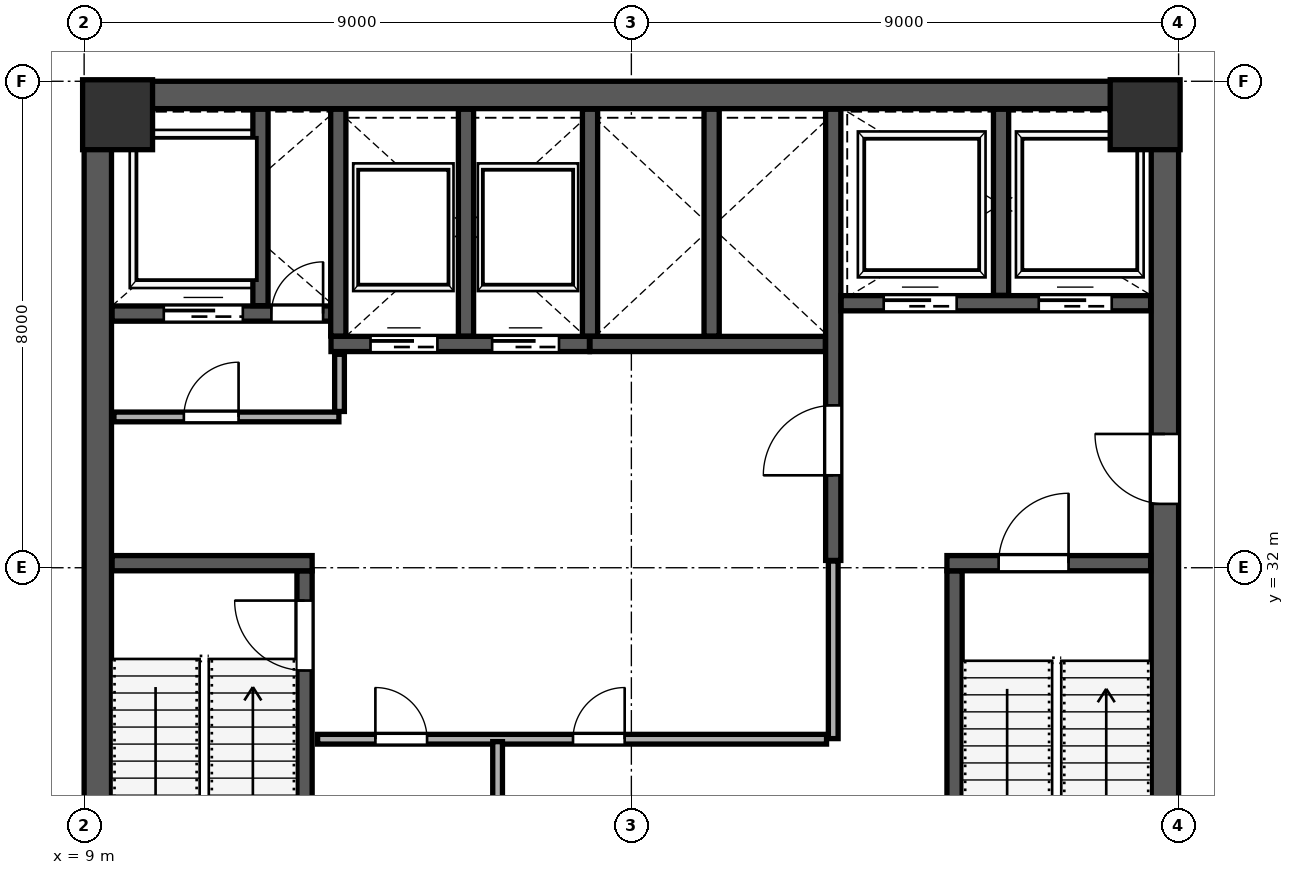
"""IFC4 building model, lengths in metres.
Left out: names, types, materials, properties, quantities, classifications, styles, units other than length and angle.
Written with IfcOpenShell. Run it as: python <this file> out.ifc"""

import sys

from ifc_helpers import new_model, si_unit, direction, frame, frame_2d, origin, origin_2d, place, context, subcontext, project, spatial, rectangle, extrude, source, transform, mapped, element, fill, save


model = new_model("IFC4")
c1 = context("Model", 3, precision=1e-05, world=origin(), true_north=direction((0.0, 1.0)))
c2 = subcontext(c1, "Body", "Model", "MODEL_VIEW")
j1 = project(units=[si_unit("LENGTHUNIT", "METRE"), si_unit("PLANEANGLEUNIT", "RADIAN")], contexts=[c1])
p1 = place(None, origin())
s1 = spatial("IfcSite", under=j1, at=p1, CompositionType="ELEMENT")
p2 = place(p1, origin())
s2 = spatial("IfcBuilding", under=s1, at=p2, CompositionType="ELEMENT")
p3 = place(p2, frame((0.0, 0.0, 183.4)))
s3 = spatial("IfcBuildingStorey", under=s2, at=p3, CompositionType="ELEMENT", Elevation=183.4)
m1 = source(origin(), c2, "Body", "SweptSolid", [
    extrude(rectangle(XDim=1.15, YDim=1.15, at=origin_2d()), origin(), (0.0, 0.0, 1.0), 4.199),
])
for number, where, z_axis, x_axis in (
    (1, (9.55, 39.45, 0.001), (0.0, 0.0, 1.0), (1.0, 0.0, 0.0)),
    (2, (26.45, 39.45, 0.001), (0.0, 0.0, 1.0), (1.0, 0.0, 0.0)),
):
    element("IfcColumn", number, at=place(p3, frame(where, z_axis=z_axis, x_axis=x_axis)), inside=s3, PredefinedType="COLUMN", context=c2, shape_type="MappedRepresentation", body=[
        mapped(m1, transform((0.0, 0.0, 0.0), scale=1.0)),
    ])
p4 = place(p3, frame((9.225, 24.45, 0.0), z_axis=(0.0, 0.0, 1.0), x_axis=(0.0, 1.0, 0.0)))
e3 = element("IfcWall", 3, at=p4, inside=s3, PredefinedType="SHEAR", context=c2, shape_type="SweptSolid", body=[
    extrude(rectangle(XDim=15.1, YDim=0.45, at=frame_2d((7.55, 0.0))), origin(), (0.0, 0.0, 1.0), 3.96),
])
p5 = place(p3, frame((26.775, 24.45, 0.0), z_axis=(0.0, 0.0, 1.0), x_axis=(0.0, 1.0, 0.0)))
e4 = element("IfcWall", 4, at=p5, inside=s3, PredefinedType="SHEAR", context=c2, shape_type="SweptSolid", body=[
    extrude(rectangle(XDim=15.1, YDim=0.45, at=frame_2d((7.55, 0.0))), origin(), (0.0, 0.0, 1.0), 3.96),
])
p6 = place(p5, frame((8.6, 0.0, 0.0)))
e5 = element("IfcOpeningElement", 5, at=p6, cuts=e4, PredefinedType="OPENING", context=c2, shape_type="SweptSolid", body=[
    extrude(rectangle(XDim=1.15, YDim=2.2, at=frame_2d((0.575, 1.1))), frame((0.0, 0.235, 0.0), z_axis=(0.0, -1.0, 0.0), x_axis=(1.0, 0.0, 0.0)), (0.0, 0.0, 1.0), 0.47),
])
p7 = place(p3, frame((9.0, 39.775, 0.0), z_axis=(0.0, 0.0, 1.0), x_axis=(1.0, 0.0, 0.0)))
e6 = element("IfcWall", 6, at=p7, inside=s3, PredefinedType="SHEAR", context=c2, shape_type="SweptSolid", body=[
    extrude(rectangle(XDim=18.0, YDim=0.45, at=frame_2d((9.0, 0.0))), origin(), (0.0, 0.0, 1.0), 3.96),
])
p8 = place(p3, frame((12.625, 24.46, 0.0), z_axis=(0.0, 0.0, 1.0), x_axis=(0.0, 1.0, 0.0)))
e7 = element("IfcWall", 7, at=p8, inside=s3, PredefinedType="SHEAR", context=c2, shape_type="SweptSolid", body=[
    extrude(rectangle(XDim=7.49, YDim=0.25, at=frame_2d((3.745, 0.0))), origin(), (0.0, 0.0, 1.0), 3.96),
])
p9 = place(p8, frame((5.85, 0.0, 0.0)))
e8 = element("IfcOpeningElement", 8, at=p9, cuts=e7, PredefinedType="OPENING", context=c2, shape_type="SweptSolid", body=[
    extrude(rectangle(XDim=1.15, YDim=2.2, at=frame_2d((0.575, 1.1))), frame((0.0, 0.135, 0.0), z_axis=(0.0, -1.0, 0.0), x_axis=(1.0, 0.0, 0.0)), (0.0, 0.0, 1.0), 0.27),
])
p10 = place(p3, frame((9.46, 32.075, 0.0), z_axis=(0.0, 0.0, 1.0), x_axis=(1.0, 0.0, 0.0)))
e9 = element("IfcWall", 9, at=p10, inside=s3, PredefinedType="SHEAR", context=c2, shape_type="SweptSolid", body=[
    extrude(rectangle(XDim=3.29, YDim=0.25, at=frame_2d((1.645, 0.0))), origin(), (0.0, 0.0, 1.0), 3.96),
])
p11 = place(p3, frame((23.315, 24.46, 0.0), z_axis=(0.0, 0.0, 1.0), x_axis=(0.0, 1.0, 0.0)))
e10 = element("IfcWall", 10, at=p11, inside=s3, PredefinedType="SHEAR", context=c2, shape_type="SweptSolid", body=[
    extrude(rectangle(XDim=7.49, YDim=0.25, at=frame_2d((3.745, 0.0))), origin(), (0.0, 0.0, 1.0), 3.96),
])
p12 = place(p3, frame((23.19, 32.075, 0.0), z_axis=(0.0, 0.0, 1.0), x_axis=(1.0, 0.0, 0.0)))
e11 = element("IfcWall", 11, at=p12, inside=s3, PredefinedType="SHEAR", context=c2, shape_type="SweptSolid", body=[
    extrude(rectangle(XDim=3.35, YDim=0.25, at=frame_2d((1.675, 0.0))), origin(), (0.0, 0.0, 1.0), 3.96),
])
p13 = place(p12, frame((0.85, 0.0, 0.0)))
e12 = element("IfcOpeningElement", 12, at=p13, cuts=e11, PredefinedType="OPENING", context=c2, shape_type="SweptSolid", body=[
    extrude(rectangle(XDim=1.15, YDim=2.2, at=frame_2d((0.575, 1.1))), frame((0.0, 0.135, 0.0), z_axis=(0.0, -1.0, 0.0), x_axis=(1.0, 0.0, 0.0)), (0.0, 0.0, 1.0), 0.27),
])
p14 = place(p3, frame((21.32, 32.12, 0.0), z_axis=(0.0, 0.0, 1.0), x_axis=(0.0, 1.0, 0.0)))
e13 = element("IfcWall", 13, at=p14, inside=s3, PredefinedType="SHEAR", context=c2, shape_type="SweptSolid", body=[
    extrude(rectangle(XDim=7.42, YDim=0.25, at=frame_2d((3.71, 0.0))), origin(), (0.0, 0.0, 1.0), 3.96),
])
p15 = place(p14, frame((1.4, 0.0, 0.0)))
e14 = element("IfcOpeningElement", 14, at=p15, cuts=e13, PredefinedType="OPENING", context=c2, shape_type="SweptSolid", body=[
    extrude(rectangle(XDim=1.15, YDim=2.2, at=frame_2d((0.575, 1.1))), frame((0.0, 0.135, 0.0), z_axis=(0.0, -1.0, 0.0), x_axis=(1.0, 0.0, 0.0)), (0.0, 0.0, 1.0), 0.27),
])
p16 = place(p3, frame((9.46, 36.18, 0.0), z_axis=(0.0, 0.0, 1.0), x_axis=(1.0, 0.0, 0.0)))
e15 = element("IfcWall", 15, at=p16, inside=s3, PredefinedType="SHEAR", context=c2, shape_type="SweptSolid", body=[
    extrude(rectangle(XDim=3.79, YDim=0.25, at=frame_2d((1.895, 0.0))), origin(), (0.0, 0.0, 1.0), 3.96),
])
p17 = place(p16, frame((2.62, 0.0, 0.0)))
e16 = element("IfcOpeningElement", 16, at=p17, cuts=e15, PredefinedType="OPENING", context=c2, shape_type="SweptSolid", body=[
    extrude(rectangle(XDim=0.85, YDim=2.1, at=frame_2d((0.425, 1.05))), frame((0.0, 0.135, 0.0), z_axis=(0.0, -1.0, 0.0), x_axis=(1.0, 0.0, 0.0)), (0.0, 0.0, 1.0), 0.27),
])
p18 = place(p16, frame((0.85, 0.0, 0.0)))
e17 = element("IfcOpeningElement", 17, at=p18, cuts=e15, PredefinedType="OPENING", context=c2, shape_type="SweptSolid", body=[
    extrude(rectangle(XDim=1.3, YDim=2.25, at=frame_2d((0.65, 1.125))), frame((0.0, 0.135, 0.0), z_axis=(0.0, -1.0, 0.0), x_axis=(1.0, 0.0, 0.0)), (0.0, 0.0, 1.0), 0.27),
])
p19 = place(p3, frame((11.9, 36.31, 0.0), z_axis=(0.0, 0.0, 1.0), x_axis=(0.0, 1.0, 0.0)))
e18 = element("IfcWall", 18, at=p19, inside=s3, PredefinedType="SHEAR", context=c2, shape_type="SweptSolid", body=[
    extrude(rectangle(XDim=3.23, YDim=0.25, at=frame_2d((1.615, 0.0))), origin(), (0.0, 0.0, 1.0), 3.96),
])
p20 = place(p3, frame((21.45, 36.35, 0.0), z_axis=(0.0, 0.0, 1.0), x_axis=(1.0, 0.0, 0.0)))
e19 = element("IfcWall", 19, at=p20, inside=s3, PredefinedType="SHEAR", context=c2, shape_type="SweptSolid", body=[
    extrude(rectangle(XDim=5.09, YDim=0.25, at=frame_2d((2.545, 0.0))), origin(), (0.0, 0.0, 1.0), 3.96),
])
p21 = place(p20, frame((0.7, 0.0, 0.0)))
e20 = element("IfcOpeningElement", 20, at=p21, cuts=e19, PredefinedType="OPENING", context=c2, shape_type="SweptSolid", body=[
    extrude(rectangle(XDim=1.2, YDim=2.2, at=frame_2d((0.6, 1.1))), frame((0.0, 0.135, 0.0), z_axis=(0.0, -1.0, 0.0), x_axis=(1.0, 0.0, 0.0)), (0.0, 0.0, 1.0), 0.27),
])
p22 = place(p20, frame((3.25, 0.0, 0.0)))
e21 = element("IfcOpeningElement", 21, at=p22, cuts=e19, PredefinedType="OPENING", context=c2, shape_type="SweptSolid", body=[
    extrude(rectangle(XDim=1.2, YDim=2.2, at=frame_2d((0.6, 1.1))), frame((0.0, 0.135, 0.0), z_axis=(0.0, -1.0, 0.0), x_axis=(1.0, 0.0, 0.0)), (0.0, 0.0, 1.0), 0.27),
])
p23 = place(p3, frame((24.08, 36.48, 0.0), z_axis=(0.0, 0.0, 1.0), x_axis=(0.0, 1.0, 0.0)))
e22 = element("IfcWall", 22, at=p23, inside=s3, PredefinedType="SHEAR", context=c2, shape_type="SweptSolid", body=[
    extrude(rectangle(XDim=3.06, YDim=0.25, at=frame_2d((1.53, 0.0))), origin(), (0.0, 0.0, 1.0), 3.96),
])
p24 = place(p3, frame((13.06, 35.68, 0.0), z_axis=(0.0, 0.0, 1.0), x_axis=(1.0, 0.0, 0.0)))
e23 = element("IfcWall", 23, at=p24, inside=s3, PredefinedType="SHEAR", context=c2, shape_type="SweptSolid", body=[
    extrude(rectangle(XDim=4.25, YDim=0.25, at=frame_2d((2.125, 0.0))), origin(), (0.0, 0.0, 1.0), 3.96),
])
p25 = place(p24, frame((0.65, 0.0, 0.0)))
e24 = element("IfcOpeningElement", 24, at=p25, cuts=e23, PredefinedType="OPENING", context=c2, shape_type="SweptSolid", body=[
    extrude(rectangle(XDim=1.1, YDim=2.2, at=frame_2d((0.55, 1.1))), frame((0.0, 0.135, 0.0), z_axis=(0.0, -1.0, 0.0), x_axis=(1.0, 0.0, 0.0)), (0.0, 0.0, 1.0), 0.27),
])
p26 = place(p24, frame((2.65, 0.0, 0.0)))
e25 = element("IfcOpeningElement", 25, at=p26, cuts=e23, PredefinedType="OPENING", context=c2, shape_type="SweptSolid", body=[
    extrude(rectangle(XDim=1.1, YDim=2.2, at=frame_2d((0.55, 1.1))), frame((0.0, 0.135, 0.0), z_axis=(0.0, -1.0, 0.0), x_axis=(1.0, 0.0, 0.0)), (0.0, 0.0, 1.0), 0.27),
])
for number, where, z_axis, x_axis in (
    (26, (13.18, 35.81, 0.0), (0.0, 0.0, 1.0), (0.0, 1.0, 0.0)),
    (27, (15.28, 35.81, 0.0), (0.0, 0.0, 1.0), (0.0, 1.0, 0.0)),
):
    element("IfcWall", number, at=place(p3, frame(where, z_axis=z_axis, x_axis=x_axis)), inside=s3, PredefinedType="SHEAR", context=c2, shape_type="SweptSolid", body=[
        extrude(rectangle(XDim=3.73, YDim=0.25, at=frame_2d((1.865, 0.0))), origin(), (0.0, 0.0, 1.0), 3.96),
    ])
p27 = place(p3, frame((17.32, 35.68, 0.0), z_axis=(0.0, 0.0, 1.0), x_axis=(1.0, 0.0, 0.0)))
e28 = element("IfcWall", 28, at=p27, inside=s3, PredefinedType="SHEAR", context=c2, shape_type="SweptSolid", body=[
    extrude(rectangle(XDim=3.87, YDim=0.25, at=frame_2d((1.935, 0.0))), origin(), (0.0, 0.0, 1.0), 3.96),
])
for number, where, z_axis, x_axis in (
    (29, (17.32, 35.81, 0.0), (0.0, 0.0, 1.0), (0.0, 1.0, 0.0)),
    (30, (19.32, 35.81, 0.0), (0.0, 0.0, 1.0), (0.0, 1.0, 0.0)),
):
    element("IfcWall", number, at=place(p3, frame(where, z_axis=z_axis, x_axis=x_axis)), inside=s3, PredefinedType="SHEAR", context=c2, shape_type="SweptSolid", body=[
        extrude(rectangle(XDim=3.73, YDim=0.25, at=frame_2d((1.865, 0.0))), origin(), (0.0, 0.0, 1.0), 3.96),
    ])
p28 = place(p3, frame((9.49, 34.48, 0.0), z_axis=(0.0, 0.0, 1.0), x_axis=(1.0, 0.0, 0.0)))
e31 = element("IfcWall", 31, at=p28, inside=s3, PredefinedType="PARTITIONING", context=c2, shape_type="SweptSolid", body=[
    extrude(rectangle(XDim=3.7, YDim=0.16, at=frame_2d((1.85, 0.0))), origin(), (0.0, 0.0, 1.0), 3.96),
])
p29 = place(p28, frame((1.15, 0.0, 0.0)))
e32 = element("IfcOpeningElement", 32, at=p29, cuts=e31, PredefinedType="OPENING", context=c2, shape_type="SweptSolid", body=[
    extrude(rectangle(XDim=0.9, YDim=2.15, at=frame_2d((0.45, 1.075))), frame((0.0, 0.09, 0.0), z_axis=(0.0, -1.0, 0.0), x_axis=(1.0, 0.0, 0.0)), (0.0, 0.0, 1.0), 0.18),
])
p30 = place(p3, frame((13.2, 34.57, 0.0), z_axis=(0.0, 0.0, 1.0), x_axis=(0.0, 1.0, 0.0)))
e33 = element("IfcWall", 33, at=p30, inside=s3, PredefinedType="PARTITIONING", context=c2, shape_type="SweptSolid", body=[
    extrude(rectangle(XDim=0.94, YDim=0.16, at=frame_2d((0.47, 0.0))), origin(), (0.0, 0.0, 1.0), 3.96),
])
p31 = place(p3, frame((12.84, 29.18, 0.0), z_axis=(0.0, 0.0, 1.0), x_axis=(1.0, 0.0, 0.0)))
e34 = element("IfcWall", 34, at=p31, inside=s3, PredefinedType="PARTITIONING", context=c2, shape_type="SweptSolid", body=[
    extrude(rectangle(XDim=8.37, YDim=0.16, at=frame_2d((4.185, 0.0))), origin(), (0.0, 0.0, 1.0), 3.96),
])
p32 = place(p31, frame((0.95, 0.0, 0.0)))
e35 = element("IfcOpeningElement", 35, at=p32, cuts=e34, PredefinedType="OPENING", context=c2, shape_type="SweptSolid", body=[
    extrude(rectangle(XDim=0.85, YDim=2.1, at=frame_2d((0.425, 1.05))), frame((0.0, 0.09, 0.0), z_axis=(0.0, -1.0, 0.0), x_axis=(1.0, 0.0, 0.0)), (0.0, 0.0, 1.0), 0.18),
])
p33 = place(p31, frame((4.2, 0.0, 0.0)))
e36 = element("IfcOpeningElement", 36, at=p33, cuts=e34, PredefinedType="OPENING", context=c2, shape_type="SweptSolid", body=[
    extrude(rectangle(XDim=0.85, YDim=2.1, at=frame_2d((0.425, 1.05))), frame((0.0, 0.09, 0.0), z_axis=(0.0, -1.0, 0.0), x_axis=(1.0, 0.0, 0.0)), (0.0, 0.0, 1.0), 0.18),
])
p34 = place(p3, frame((15.8, 24.54, 0.0), z_axis=(0.0, 0.0, 1.0), x_axis=(0.0, 1.0, 0.0)))
e37 = element("IfcWall", 37, at=p34, inside=s3, PredefinedType="PARTITIONING", context=c2, shape_type="SweptSolid", body=[
    extrude(rectangle(XDim=4.6, YDim=0.16, at=frame_2d((2.3, 0.0))), origin(), (0.0, 0.0, 1.0), 3.96),
])
p35 = place(p3, frame((21.32, 29.19, 0.0), z_axis=(0.0, 0.0, 1.0), x_axis=(0.0, 1.0, 0.0)))
e38 = element("IfcWall", 38, at=p35, inside=s3, PredefinedType="PARTITIONING", context=c2, shape_type="SweptSolid", body=[
    extrude(rectangle(XDim=2.92, YDim=0.16, at=frame_2d((1.46, 0.0))), origin(), (0.0, 0.0, 1.0), 3.96),
])
p36 = place(p3, frame((13.23, 49.696, 0.0), z_axis=(0.0, 0.0, 1.0), x_axis=(0.866026251752, -0.499998531275, 0.0)))
e39 = element("IfcWall", 39, at=p36, inside=s3, PredefinedType="PARTITIONING", context=c2, shape_type="SweptSolid", body=[
    extrude(rectangle(XDim=26.69, YDim=0.115, at=frame_2d((13.345, 0.0))), origin(), (0.0, 0.0, 1.0), 3.96),
])
p37 = place(p36, frame((2.1, 0.0, 0.0)))
e40 = element("IfcOpeningElement", 40, at=p37, cuts=e39, PredefinedType="OPENING", context=c2, shape_type="SweptSolid", body=[
    extrude(rectangle(XDim=0.95, YDim=2.15, at=frame_2d((0.475, 1.075))), frame((0.0, 0.067, 0.0), z_axis=(0.0, -1.0, 0.0), x_axis=(1.0, 0.0, 0.0)), (0.0, 0.0, 1.0), 0.135),
])
p38 = place(p36, frame((18.2, 0.0, 0.0)))
e41 = element("IfcOpeningElement", 41, at=p38, cuts=e39, PredefinedType="OPENING", context=c2, shape_type="SweptSolid", body=[
    extrude(rectangle(XDim=0.95, YDim=2.15, at=frame_2d((0.475, 1.075))), frame((0.0, 0.067, 0.0), z_axis=(0.0, -1.0, 0.0), x_axis=(1.0, 0.0, 0.0)), (0.0, 0.0, 1.0), 0.135),
])
p39 = place(p3, frame((1.625, 29.676, 0.0), z_axis=(0.0, 0.0, 1.0), x_axis=(0.500002707681, 0.866023840498, 0.0)))
e42 = element("IfcWall", 42, at=p39, inside=s3, PredefinedType="PARTITIONING", context=c2, shape_type="SweptSolid", body=[
    extrude(rectangle(XDim=23.1, YDim=0.115, at=frame_2d((11.55, 0.0))), origin(), (0.0, 0.0, 1.0), 3.96),
])
p40 = place(p39, frame((1.3, 0.0, 0.0)))
e43 = element("IfcOpeningElement", 43, at=p40, cuts=e42, PredefinedType="OPENING", context=c2, shape_type="SweptSolid", body=[
    extrude(rectangle(XDim=0.95, YDim=2.15, at=frame_2d((0.475, 1.075))), frame((0.0, 0.067, 0.0), z_axis=(0.0, -1.0, 0.0), x_axis=(1.0, 0.0, 0.0)), (0.0, 0.0, 1.0), 0.135),
])
p41 = place(p39, frame((14.6, 0.0, 0.0)))
e44 = element("IfcOpeningElement", 44, at=p41, cuts=e42, PredefinedType="OPENING", context=c2, shape_type="SweptSolid", body=[
    extrude(rectangle(XDim=0.95, YDim=2.15, at=frame_2d((0.475, 1.075))), frame((0.0, 0.067, 0.0), z_axis=(0.0, -1.0, 0.0), x_axis=(1.0, 0.0, 0.0)), (0.0, 0.0, 1.0), 0.135),
])
p42 = place(p3, frame((21.774, 11.034, 0.0), z_axis=(0.0, 0.0, 1.0), x_axis=(0.500008037328, 0.866020763381, 0.0)))
e45 = element("IfcWall", 45, at=p42, inside=s3, PredefinedType="PARTITIONING", context=c2, shape_type="SweptSolid", body=[
    extrude(rectangle(XDim=19.98, YDim=0.16, at=frame_2d((9.99, 0.0))), origin(), (0.0, 0.0, 1.0), 3.96),
])
m2 = source(origin(), c2, "Body", "SweptSolid", [
    extrude(rectangle(XDim=1.15, YDim=2.2, at=frame_2d((0.575, 1.1))), frame((0.0, 0.025, 0.0), z_axis=(0.0, -1.0, 0.0), x_axis=(1.0, 0.0, 0.0)), (0.0, 0.0, 1.0), 0.05),
])
p43 = place(p9, origin())
e46 = element("IfcDoor", 46, at=p43, inside=s3, OperationType="SINGLE_SWING_RIGHT", PredefinedType="DOOR", context=c2, shape_type="MappedRepresentation", body=[
    mapped(m2, transform((0.0, 0.0, 0.0), scale=1.0)),
])
fill(e8, e46)
m3 = source(origin(), c2, "Body", "SweptSolid", [
    extrude(rectangle(XDim=1.15, YDim=2.2, at=frame_2d((0.575, 1.1))), frame((0.0, 0.025, 0.0), z_axis=(0.0, -1.0, 0.0), x_axis=(1.0, 0.0, 0.0)), (0.0, 0.0, 1.0), 0.05),
])
p44 = place(p15, origin())
e47 = element("IfcDoor", 47, at=p44, inside=s3, OperationType="SINGLE_SWING_LEFT", PredefinedType="DOOR", context=c2, shape_type="MappedRepresentation", body=[
    mapped(m3, transform((0.0, 0.0, 0.0), scale=1.0)),
])
fill(e14, e47)
p45 = place(p13, origin())
e48 = element("IfcDoor", 48, at=p45, inside=s3, OperationType="SINGLE_SWING_RIGHT", PredefinedType="DOOR", context=c2, shape_type="MappedRepresentation", body=[
    mapped(m2, transform((0.0, 0.0, 0.0), scale=1.0)),
])
fill(e12, e48)
p46 = place(p6, origin())
e49 = element("IfcDoor", 49, at=p46, inside=s3, OperationType="SINGLE_SWING_RIGHT", PredefinedType="DOOR", context=c2, shape_type="MappedRepresentation", body=[
    mapped(m3, transform((0.0, 0.0, 0.0), scale=1.0)),
])
fill(e5, e49)
m4 = source(origin(), c2, "Body", "SweptSolid", [
    extrude(rectangle(XDim=0.85, YDim=2.1, at=frame_2d((0.425, 1.05))), frame((0.0, 0.025, 0.0), z_axis=(0.0, -1.0, 0.0), x_axis=(1.0, 0.0, 0.0)), (0.0, 0.0, 1.0), 0.05),
])
p47 = place(p17, origin())
e50 = element("IfcDoor", 50, at=p47, inside=s3, OperationType="SINGLE_SWING_RIGHT", PredefinedType="DOOR", context=c2, shape_type="MappedRepresentation", body=[
    mapped(m4, transform((0.0, 0.0, 0.0), scale=1.0)),
])
fill(e16, e50)
m5 = source(origin(), c2, "Body", "SweptSolid", [
    extrude(rectangle(XDim=1.1, YDim=2.2, at=frame_2d((0.55, 1.1))), frame((0.0, 0.025, 0.0), z_axis=(0.0, -1.0, 0.0), x_axis=(1.0, 0.0, 0.0)), (0.0, 0.0, 1.0), 0.05),
])
p48 = place(p25, origin())
e51 = element("IfcDoor", 51, at=p48, inside=s3, OperationType="SLIDING_TO_LEFT", PredefinedType="DOOR", context=c2, shape_type="MappedRepresentation", body=[
    mapped(m5, transform((0.0, 0.0, 0.0), scale=1.0)),
])
fill(e24, e51)
p49 = place(p26, origin())
e52 = element("IfcDoor", 52, at=p49, inside=s3, OperationType="SLIDING_TO_RIGHT", PredefinedType="DOOR", context=c2, shape_type="MappedRepresentation", body=[
    mapped(m5, transform((0.0, 0.0, 0.0), scale=1.0)),
])
fill(e25, e52)
m6 = source(origin(), c2, "Body", "SweptSolid", [
    extrude(rectangle(XDim=1.2, YDim=2.2, at=frame_2d((0.6, 1.1))), frame((0.0, 0.025, 0.0), z_axis=(0.0, -1.0, 0.0), x_axis=(1.0, 0.0, 0.0)), (0.0, 0.0, 1.0), 0.05),
])
p50 = place(p21, origin())
e53 = element("IfcDoor", 53, at=p50, inside=s3, OperationType="SLIDING_TO_LEFT", PredefinedType="DOOR", context=c2, shape_type="MappedRepresentation", body=[
    mapped(m6, transform((0.0, 0.0, 0.0), scale=1.0)),
])
fill(e20, e53)
p51 = place(p22, origin())
e54 = element("IfcDoor", 54, at=p51, inside=s3, OperationType="SLIDING_TO_RIGHT", PredefinedType="DOOR", context=c2, shape_type="MappedRepresentation", body=[
    mapped(m6, transform((0.0, 0.0, 0.0), scale=1.0)),
])
fill(e21, e54)
m7 = source(origin(), c2, "Body", "SweptSolid", [
    extrude(rectangle(XDim=1.3, YDim=2.25, at=frame_2d((0.65, 1.125))), frame((0.0, 0.025, 0.0), z_axis=(0.0, -1.0, 0.0), x_axis=(1.0, 0.0, 0.0)), (0.0, 0.0, 1.0), 0.05),
])
p52 = place(p18, origin())
e55 = element("IfcDoor", 55, at=p52, inside=s3, OperationType="SLIDING_TO_LEFT", PredefinedType="DOOR", context=c2, shape_type="MappedRepresentation", body=[
    mapped(m7, transform((0.0, 0.0, 0.0), scale=1.0)),
])
fill(e17, e55)
m8 = source(origin(), c2, "Body", "SweptSolid", [
    extrude(rectangle(XDim=0.9, YDim=2.15, at=frame_2d((0.45, 1.075))), frame((0.0, 0.025, 0.0), z_axis=(0.0, -1.0, 0.0), x_axis=(1.0, 0.0, 0.0)), (0.0, 0.0, 1.0), 0.05),
])
p53 = place(p29, origin())
e56 = element("IfcDoor", 56, at=p53, inside=s3, OperationType="SINGLE_SWING_RIGHT", PredefinedType="DOOR", context=c2, shape_type="MappedRepresentation", body=[
    mapped(m8, transform((0.0, 0.0, 0.0), scale=1.0)),
])
fill(e32, e56)
p54 = place(p32, origin())
e57 = element("IfcDoor", 57, at=p54, inside=s3, OperationType="SINGLE_SWING_LEFT", PredefinedType="DOOR", context=c2, shape_type="MappedRepresentation", body=[
    mapped(m4, transform((0.0, 0.0, 0.0), scale=1.0)),
])
fill(e35, e57)
p55 = place(p33, origin())
e58 = element("IfcDoor", 58, at=p55, inside=s3, OperationType="SINGLE_SWING_RIGHT", PredefinedType="DOOR", context=c2, shape_type="MappedRepresentation", body=[
    mapped(m4, transform((0.0, 0.0, 0.0), scale=1.0)),
])
fill(e36, e58)
save(model, sys.argv[1])
